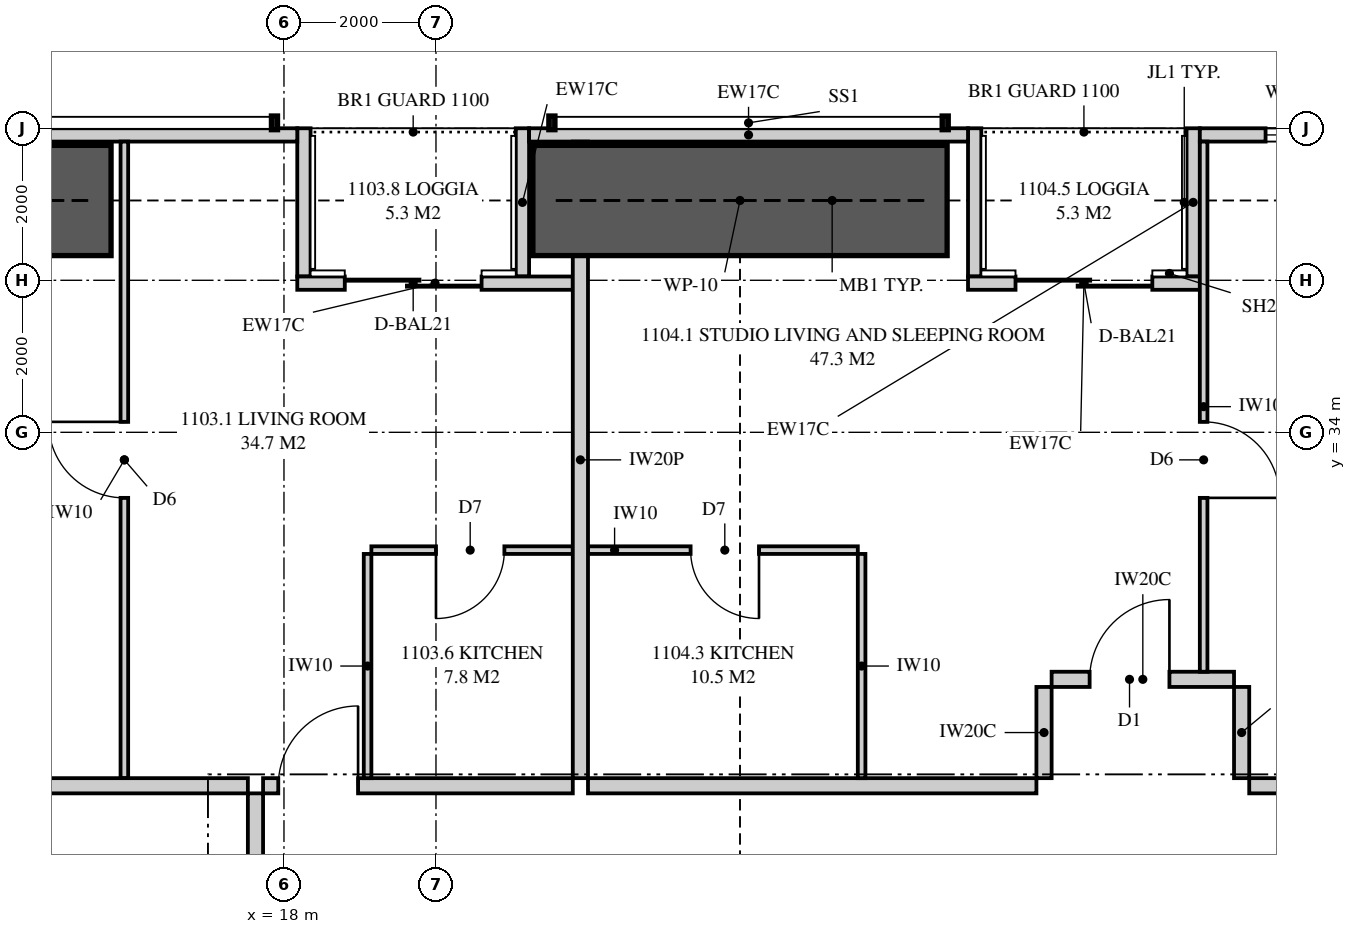
"""IFC4 building model, lengths in metres.
Left out: names, types, materials, properties, quantities, classifications, styles, units other than length and angle.
Written with IfcOpenShell. Run it as: python <this file> out.ifc"""

import sys

from ifc_helpers import new_model, si_unit, direction, frame, frame_2d, origin, place, context, subcontext, project, spatial, polyline, rectangle, outline, extrude, element, fill, save


model = new_model("IFC4")
c1 = context("Model", 3, precision=1e-05, world=origin(), true_north=direction((0.0, 1.0)))
c2 = subcontext(c1, "Body", "Model", "MODEL_VIEW")
j1 = project(units=[si_unit("LENGTHUNIT", "METRE"), si_unit("PLANEANGLEUNIT", "RADIAN")], contexts=[c1])
p1 = place(None, origin())
s1 = spatial("IfcSite", under=j1, at=p1, CompositionType="ELEMENT")
p2 = place(p1, origin())
s2 = spatial("IfcBuilding", under=s1, at=p2, CompositionType="ELEMENT")
p3 = place(p2, frame((0.0, 0.0, 44.45)))
s3 = spatial("IfcBuildingStorey", under=s2, at=p3, CompositionType="ELEMENT", Elevation=44.45)
p4 = place(p3, frame((38.149, 37.913, 0.0), z_axis=(0.0, 0.0, 1.0), x_axis=(-1.0, 0.0, 0.0)))
e1 = element("IfcWall", 1, at=p4, inside=s3, PredefinedType="SOLIDWALL", context=c2, shape_type="SweptSolid", body=[
    extrude(outline(polyline([(0.0, 0.0), (8.099, 0.0), (8.099, 2.15), (3.149, 2.15), (3.149, 3.11), (2.993, 3.11), (2.993, 2.15), (2.945, 2.15), (2.945, 3.11), (0.0, 3.11), (0.0, 0.0)])), frame((0.0, 0.087, 0.0), z_axis=(0.0, -1.0, 0.0), x_axis=(1.0, 0.0, 0.0)), (0.0, 0.0, 1.0), 0.175),
])
p5 = place(p4, frame((6.034, 0.0, 0.4)))
e2 = element("IfcOpeningElement", 2, at=p5, cuts=e1, PredefinedType="OPENING", context=c2, shape_type="SweptSolid", body=[
    extrude(rectangle(XDim=1.2, YDim=1.7, at=frame_2d((0.6, 0.85))), frame((0.0, 0.097, 0.0), z_axis=(0.0, -1.0, 0.0), x_axis=(1.0, 0.0, 0.0)), (0.0, 0.0, 1.0), 0.195),
])
p6 = place(p3, frame((27.0, 37.913, 0.0), z_axis=(0.0, 0.0, 1.0), x_axis=(-1.0, 0.0, 0.0)))
e3 = element("IfcWall", 3, at=p6, inside=s3, PredefinedType="SOLIDWALL", context=c2, shape_type="SweptSolid", body=[
    extrude(rectangle(XDim=5.775, YDim=0.175, at=frame_2d((2.887, 0.0))), origin(), (0.0, 0.0, 1.0), 2.15),
])
p7 = place(p3, frame((18.175, 37.913, 0.0), z_axis=(0.0, 0.0, 1.0), x_axis=(-1.0, 0.0, 0.0)))
e4 = element("IfcWall", 4, at=p7, inside=s3, PredefinedType="SOLIDWALL", context=c2, shape_type="SweptSolid", body=[
    extrude(outline(polyline([(0.0, 0.0), (13.124, 0.0), (13.124, 3.11), (5.379, 3.11), (5.379, 2.15), (5.331, 2.15), (5.331, 3.11), (5.175, 3.11), (5.175, 2.15), (0.0, 2.15), (0.0, 0.0)])), frame((0.0, 0.087, 0.0), z_axis=(0.0, -1.0, 0.0), x_axis=(1.0, 0.0, 0.0)), (0.0, 0.0, 1.0), 0.175),
])
p8 = place(p7, frame((9.125, 0.0, 0.4)))
e5 = element("IfcOpeningElement", 5, at=p8, cuts=e4, PredefinedType="OPENING", context=c2, shape_type="SweptSolid", body=[
    extrude(rectangle(XDim=1.8, YDim=1.7, at=frame_2d((0.9, 0.85))), frame((0.0, 0.097, 0.0), z_axis=(0.0, -1.0, 0.0), x_axis=(1.0, 0.0, 0.0)), (0.0, 0.0, 1.0), 0.195),
])
p9 = place(p3, frame((30.05, 35.962, 0.0), z_axis=(0.0, 0.0, 1.0), x_axis=(-1.0, 0.0, 0.0)))
e6 = element("IfcWall", 6, at=p9, inside=s3, PredefinedType="SOLIDWALL", context=c2, shape_type="SweptSolid", body=[
    extrude(rectangle(XDim=3.05, YDim=0.175, at=frame_2d((1.525, 0.0))), origin(), (0.0, 0.0, 1.0), 3.11),
])
p10 = place(p9, frame((0.625, 0.0, 0.0)))
e7 = element("IfcOpeningElement", 7, at=p10, cuts=e6, PredefinedType="OPENING", context=c2, shape_type="SweptSolid", body=[
    extrude(rectangle(XDim=1.8, YDim=2.1, at=frame_2d((0.9, 1.05))), frame((0.0, 0.097, 0.0), z_axis=(0.0, -1.0, 0.0), x_axis=(1.0, 0.0, 0.0)), (0.0, 0.0, 1.0), 0.195),
])
for number, where, z_axis, x_axis in (
    (8, (29.962, 38.0, 0.0), (0.0, 0.0, 1.0), (0.0, -1.0, 0.0)),
    (9, (27.087, 38.0, 0.0), (0.0, 0.0, 1.0), (0.0, -1.0, 0.0)),
):
    element("IfcWall", number, at=place(p3, frame(where, z_axis=z_axis, x_axis=x_axis)), inside=s3, PredefinedType="SOLIDWALL", context=c2, shape_type="SweptSolid", body=[
        extrude(outline(polyline([(0.0, 0.0), (1.95, 0.0), (1.95, 3.11), (1.75, 3.11), (1.75, 2.15), (0.15, 2.15), (0.15, 3.11), (0.0, 3.11), (0.0, 0.0)])), frame((0.0, 0.087, 0.0), z_axis=(0.0, -1.0, 0.0), x_axis=(1.0, 0.0, 0.0)), (0.0, 0.0, 1.0), 0.175),
    ])
p11 = place(p3, frame((21.8, 35.962, 0.0), z_axis=(0.0, 0.0, 1.0), x_axis=(-1.0, 0.0, 0.0)))
e10 = element("IfcWall", 10, at=p11, inside=s3, PredefinedType="SOLIDWALL", context=c2, shape_type="SweptSolid", body=[
    extrude(rectangle(XDim=3.625, YDim=0.175, at=frame_2d((1.812, 0.0))), origin(), (0.0, 0.0, 1.0), 3.11),
])
p12 = place(p11, frame((1.2, 0.0, 0.0)))
e11 = element("IfcOpeningElement", 11, at=p12, cuts=e10, PredefinedType="OPENING", context=c2, shape_type="SweptSolid", body=[
    extrude(rectangle(XDim=1.8, YDim=2.1, at=frame_2d((0.9, 1.05))), frame((0.0, 0.097, 0.0), z_axis=(0.0, -1.0, 0.0), x_axis=(1.0, 0.0, 0.0)), (0.0, 0.0, 1.0), 0.195),
])
for number, where, z_axis, x_axis in (
    (12, (21.137, 38.0, 0.0), (0.0, 0.0, 1.0), (0.0, -1.0, 0.0)),
    (13, (18.262, 38.0, 0.0), (0.0, 0.0, 1.0), (0.0, -1.0, 0.0)),
):
    element("IfcWall", number, at=place(p3, frame(where, z_axis=z_axis, x_axis=x_axis)), inside=s3, PredefinedType="SOLIDWALL", context=c2, shape_type="SweptSolid", body=[
        extrude(outline(polyline([(0.0, 0.0), (1.95, 0.0), (1.95, 3.11), (1.75, 3.11), (1.75, 2.15), (0.15, 2.15), (0.15, 3.11), (0.0, 3.11), (0.0, 0.0)])), frame((0.0, 0.087, 0.0), z_axis=(0.0, -1.0, 0.0), x_axis=(1.0, 0.0, 0.0)), (0.0, 0.0, 1.0), 0.175),
    ])
p13 = place(p3, frame((21.9, 37.825, 0.0), z_axis=(0.0, 0.0, 1.0), x_axis=(0.0, -1.0, 0.0)))
e14 = element("IfcWall", 14, at=p13, inside=s3, PredefinedType="PARTITIONING", context=c2, shape_type="SweptSolid", body=[
    extrude(outline(polyline([(0.529, 2.15), (0.0, 2.15), (0.0, 0.0), (0.529, 0.0), (0.529, 0.056), (1.021, 0.056), (1.021, 0.0), (8.375, 0.0), (8.375, 3.11), (1.685, 3.11), (1.685, 2.15), (1.021, 2.15), (1.021, 2.094), (0.529, 2.094), (0.529, 2.15)])), frame((0.0, 0.1, 0.0), z_axis=(0.0, -1.0, 0.0), x_axis=(1.0, 0.0, 0.0)), (0.0, 0.0, 1.0), 0.2),
])
p14 = place(p3, frame((17.725, 29.35, 0.0), z_axis=(0.0, 0.0, 1.0), x_axis=(1.0, 0.0, 0.0)))
e15 = element("IfcWall", 15, at=p14, inside=s3, PredefinedType="PARTITIONING", context=c2, shape_type="SweptSolid", body=[
    extrude(rectangle(XDim=4.075, YDim=0.2, at=frame_2d((2.038, 0.0))), origin(), (0.0, 0.0, 1.0), 3.11),
])
p15 = place(p14, frame((0.2, 0.0, 0.0)))
e16 = element("IfcOpeningElement", 16, at=p15, cuts=e15, PredefinedType="OPENING", context=c2, shape_type="SweptSolid", body=[
    extrude(rectangle(XDim=1.05, YDim=2.2, at=frame_2d((0.525, 1.1))), frame((0.0, 0.11, 0.0), z_axis=(0.0, -1.0, 0.0), x_axis=(1.0, 0.0, 0.0)), (0.0, 0.0, 1.0), 0.22),
])
p16 = place(p3, frame((19.15, 32.45, 0.0), z_axis=(0.0, 0.0, 1.0), x_axis=(1.0, 0.0, 0.0)))
e17 = element("IfcWall", 17, at=p16, inside=s3, PredefinedType="PARTITIONING", context=c2, shape_type="SweptSolid", body=[
    extrude(rectangle(XDim=2.65, YDim=0.1, at=frame_2d((1.325, 0.0))), origin(), (0.0, 0.0, 1.0), 3.11),
])
p17 = place(p16, frame((0.85, 0.0, 0.0)))
e18 = element("IfcOpeningElement", 18, at=p17, cuts=e17, PredefinedType="OPENING", context=c2, shape_type="SweptSolid", body=[
    extrude(rectangle(XDim=0.9, YDim=2.1, at=frame_2d((0.45, 1.05))), frame((0.0, 0.06, 0.0), z_axis=(0.0, -1.0, 0.0), x_axis=(1.0, 0.0, 0.0)), (0.0, 0.0, 1.0), 0.12),
])
p18 = place(p3, frame((19.1, 32.4, 0.0), z_axis=(0.0, 0.0, 1.0), x_axis=(0.0, -1.0, 0.0)))
e19 = element("IfcWall", 19, at=p18, inside=s3, PredefinedType="PARTITIONING", context=c2, shape_type="SweptSolid", body=[
    extrude(rectangle(XDim=2.95, YDim=0.1, at=frame_2d((1.475, 0.0))), origin(), (0.0, 0.0, 1.0), 3.11),
])
p19 = place(p3, frame((15.9, 37.825, 0.0), z_axis=(0.0, 0.0, 1.0), x_axis=(0.0, -1.0, 0.0)))
e20 = element("IfcWall", 20, at=p19, inside=s3, PredefinedType="PARTITIONING", context=c2, shape_type="SweptSolid", body=[
    extrude(outline(polyline([(0.0, 0.0), (8.375, 0.0), (8.375, 3.11), (1.635, 3.11), (1.635, 2.15), (0.0, 2.15), (0.0, 3.11), (0.0, 0.0)])), frame((0.0, 0.05, 0.0), z_axis=(0.0, -1.0, 0.0), x_axis=(1.0, 0.0, 0.0)), (0.0, 0.0, 1.0), 0.1),
])
p20 = place(p19, frame((3.688, 0.0, 0.0)))
e21 = element("IfcOpeningElement", 21, at=p20, cuts=e20, PredefinedType="OPENING", context=c2, shape_type="SweptSolid", body=[
    extrude(rectangle(XDim=1.0, YDim=2.1, at=frame_2d((0.5, 1.05))), frame((0.0, 0.06, 0.0), z_axis=(0.0, -1.0, 0.0), x_axis=(1.0, 0.0, 0.0)), (0.0, 0.0, 1.0), 0.12),
])
p21 = place(p3, frame((22.0, 29.35, 0.0), z_axis=(0.0, 0.0, 1.0), x_axis=(1.0, 0.0, 0.0)))
e22 = element("IfcWall", 22, at=p21, inside=s3, PredefinedType="PARTITIONING", context=c2, shape_type="SweptSolid", body=[
    extrude(outline(polyline([(0.0, 0.0), (5.9, 0.0), (5.9, 3.11), (2.337, 3.11), (2.337, 2.541), (1.663, 2.541), (1.663, 3.11), (0.0, 3.11), (0.0, 0.0)])), frame((0.0, 0.1, 0.0), z_axis=(0.0, -1.0, 0.0), x_axis=(1.0, 0.0, 0.0)), (0.0, 0.0, 1.0), 0.2),
])
p22 = place(p3, frame((22.0, 32.45, 0.0), z_axis=(0.0, 0.0, 1.0), x_axis=(1.0, 0.0, 0.0)))
e23 = element("IfcWall", 23, at=p22, inside=s3, PredefinedType="PARTITIONING", context=c2, shape_type="SweptSolid", body=[
    extrude(outline(polyline([(0.0, 0.0), (3.55, 0.0), (3.55, 3.11), (2.287, 3.11), (2.287, 2.541), (1.713, 2.541), (1.713, 3.11), (0.0, 3.11), (0.0, 0.0)])), frame((0.0, 0.05, 0.0), z_axis=(0.0, -1.0, 0.0), x_axis=(1.0, 0.0, 0.0)), (0.0, 0.0, 1.0), 0.1),
])
p23 = place(p22, frame((1.35, 0.0, 0.0)))
e24 = element("IfcOpeningElement", 24, at=p23, cuts=e23, PredefinedType="OPENING", context=c2, shape_type="SweptSolid", body=[
    extrude(rectangle(XDim=0.9, YDim=2.1, at=frame_2d((0.45, 1.05))), frame((0.0, 0.06, 0.0), z_axis=(0.0, -1.0, 0.0), x_axis=(1.0, 0.0, 0.0)), (0.0, 0.0, 1.0), 0.12),
])
p24 = place(p3, frame((25.6, 32.4, 0.0), z_axis=(0.0, 0.0, 1.0), x_axis=(0.0, -1.0, 0.0)))
e25 = element("IfcWall", 25, at=p24, inside=s3, PredefinedType="PARTITIONING", context=c2, shape_type="SweptSolid", body=[
    extrude(rectangle(XDim=2.95, YDim=0.1, at=frame_2d((1.475, 0.0))), origin(), (0.0, 0.0, 1.0), 3.11),
])
p25 = place(p3, frame((30.1, 37.825, 0.0), z_axis=(0.0, 0.0, 1.0), x_axis=(0.0, -1.0, 0.0)))
e26 = element("IfcWall", 26, at=p25, inside=s3, PredefinedType="PARTITIONING", context=c2, shape_type="SweptSolid", body=[
    extrude(outline(polyline([(0.0, 0.0), (6.975, 0.0), (6.975, 3.11), (1.635, 3.11), (1.635, 2.15), (0.0, 2.15), (0.0, 3.11), (0.0, 0.0)])), frame((0.0, 0.05, 0.0), z_axis=(0.0, -1.0, 0.0), x_axis=(1.0, 0.0, 0.0)), (0.0, 0.0, 1.0), 0.1),
])
p26 = place(p25, frame((3.688, 0.0, 0.0)))
e27 = element("IfcOpeningElement", 27, at=p26, cuts=e26, PredefinedType="OPENING", context=c2, shape_type="SweptSolid", body=[
    extrude(rectangle(XDim=1.0, YDim=2.1, at=frame_2d((0.5, 1.05))), frame((0.0, 0.06, 0.0), z_axis=(0.0, -1.0, 0.0), x_axis=(1.0, 0.0, 0.0)), (0.0, 0.0, 1.0), 0.12),
])
p27 = place(p3, frame((2.0, 29.35, 0.0), z_axis=(0.0, 0.0, 1.0), x_axis=(1.0, 0.0, 0.0)))
e28 = element("IfcWall", 28, at=p27, inside=s3, PredefinedType="PARTITIONING", context=c2, shape_type="SweptSolid", body=[
    extrude(outline(polyline([(0.0, 0.0), (15.525, 0.0), (15.525, 3.11), (11.337, 3.11), (11.337, 2.541), (10.663, 2.541), (10.663, 3.11), (9.51, 3.11), (9.51, 2.51), (6.89, 2.51), (6.89, 3.11), (2.969, 3.11), (2.969, 2.541), (2.577, 2.541), (2.577, 2.15), (0.733, 2.15), (0.733, 3.11), (0.0, 3.11), (0.0, 0.0)])), frame((0.0, 0.1, 0.0), z_axis=(0.0, -1.0, 0.0), x_axis=(1.0, 0.0, 0.0)), (0.0, 0.0, 1.0), 0.2),
])
p28 = place(p3, frame((17.625, 15.25, 0.0), z_axis=(0.0, 0.0, 1.0), x_axis=(0.0, 1.0, 0.0)))
e29 = element("IfcWall", 29, at=p28, inside=s3, PredefinedType="PARTITIONING", context=c2, shape_type="SweptSolid", body=[
    extrude(outline(polyline([(0.0, 0.0), (14.0, 0.0), (14.0, 3.11), (10.087, 3.11), (10.087, 2.541), (9.413, 2.541), (9.413, 3.11), (0.0, 3.11), (0.0, 0.0)])), frame((0.0, 0.1, 0.0), z_axis=(0.0, -1.0, 0.0), x_axis=(1.0, 0.0, 0.0)), (0.0, 0.0, 1.0), 0.2),
])
p29 = place(p28, frame((6.5, 0.0, 0.0)))
e30 = element("IfcOpeningElement", 30, at=p29, cuts=e29, PredefinedType="OPENING", context=c2, shape_type="SweptSolid", body=[
    extrude(rectangle(XDim=1.05, YDim=2.2, at=frame_2d((0.525, 1.1))), frame((0.0, 0.11, 0.0), z_axis=(0.0, -1.0, 0.0), x_axis=(1.0, 0.0, 0.0)), (0.0, 0.0, 1.0), 0.22),
])
p30 = place(p3, frame((30.7, 29.35, 0.0), z_axis=(0.0, 0.0, 1.0), x_axis=(1.0, 0.0, 0.0)))
e31 = element("IfcWall", 31, at=p30, inside=s3, PredefinedType="PARTITIONING", context=c2, shape_type="SweptSolid", body=[
    extrude(outline(polyline([(0.0, 0.0), (5.5, 0.0), (5.5, 3.11), (4.637, 3.11), (4.637, 2.541), (3.963, 2.541), (3.963, 3.11), (0.0, 3.11), (0.0, 0.0)])), frame((0.0, 0.1, 0.0), z_axis=(0.0, -1.0, 0.0), x_axis=(1.0, 0.0, 0.0)), (0.0, 0.0, 1.0), 0.2),
])
p31 = place(p3, frame((28.1, 30.75, 0.0), z_axis=(0.0, 0.0, 1.0), x_axis=(1.0, 0.0, 0.0)))
e32 = element("IfcWall", 32, at=p31, inside=s3, PredefinedType="PARTITIONING", context=c2, shape_type="SweptSolid", body=[
    extrude(rectangle(XDim=2.4, YDim=0.2, at=frame_2d((1.2, 0.0))), origin(), (0.0, 0.0, 1.0), 3.11),
])
p32 = place(p31, frame((0.5, 0.0, 0.0)))
e33 = element("IfcOpeningElement", 33, at=p32, cuts=e32, PredefinedType="OPENING", context=c2, shape_type="SweptSolid", body=[
    extrude(rectangle(XDim=1.05, YDim=2.2, at=frame_2d((0.525, 1.1))), frame((0.0, 0.11, 0.0), z_axis=(0.0, -1.0, 0.0), x_axis=(1.0, 0.0, 0.0)), (0.0, 0.0, 1.0), 0.22),
])
for number, where, z_axis, x_axis in (
    (34, (28.0, 29.45, 0.0), (0.0, 0.0, 1.0), (0.0, 1.0, 0.0)),
    (35, (30.6, 29.45, 0.0), (0.0, 0.0, 1.0), (0.0, 1.0, 0.0)),
):
    element("IfcWall", number, at=place(p3, frame(where, z_axis=z_axis, x_axis=x_axis)), inside=s3, PredefinedType="PARTITIONING", context=c2, shape_type="SweptSolid", body=[
        extrude(rectangle(XDim=1.2, YDim=0.2, at=frame_2d((0.6, 0.0))), origin(), (0.0, 0.0, 1.0), 3.11),
    ])
for number, where, z_axis, x_axis in (
    (36, (21.275, 37.05, 0.0), (0.0, 0.0, 1.0), (1.0, 0.0, 0.0)),
    (37, (10.275, 37.05, 0.0), (0.0, 0.0, 1.0), (1.0, 0.0, 0.0)),
):
    element("IfcWall", number, at=place(p3, frame(where, z_axis=z_axis, x_axis=x_axis)), inside=s3, PredefinedType="SHEAR", context=c2, shape_type="SweptSolid", body=[
        extrude(rectangle(XDim=5.45, YDim=1.45, at=frame_2d((2.725, 0.0))), origin(), (0.0, 0.0, 1.0), 3.35),
    ])
p33 = place(p5, origin())
e38 = element("IfcWindow", 38, at=p33, inside=s3, PartitioningType="SINGLE_PANEL", PredefinedType="WINDOW", context=c2, shape_type="SweptSolid", body=[
    extrude(rectangle(XDim=1.2, YDim=1.7, at=frame_2d((0.6, 0.85))), frame((0.0, 0.03, 0.0), z_axis=(0.0, -1.0, 0.0), x_axis=(1.0, 0.0, 0.0)), (0.0, 0.0, 1.0), 0.06),
])
fill(e2, e38)
p34 = place(p10, origin())
e39 = element("IfcDoor", 39, at=p34, inside=s3, OperationType="SLIDING_TO_LEFT", PredefinedType="DOOR", context=c2, shape_type="SweptSolid", body=[
    extrude(rectangle(XDim=1.8, YDim=2.1, at=frame_2d((0.9, 1.05))), frame((0.0, 0.025, 0.0), z_axis=(0.0, -1.0, 0.0), x_axis=(1.0, 0.0, 0.0)), (0.0, 0.0, 1.0), 0.05),
])
fill(e7, e39)
p35 = place(p12, origin())
e40 = element("IfcDoor", 40, at=p35, inside=s3, OperationType="SLIDING_TO_LEFT", PredefinedType="DOOR", context=c2, shape_type="SweptSolid", body=[
    extrude(rectangle(XDim=1.8, YDim=2.1, at=frame_2d((0.9, 1.05))), frame((0.0, 0.025, 0.0), z_axis=(0.0, -1.0, 0.0), x_axis=(1.0, 0.0, 0.0)), (0.0, 0.0, 1.0), 0.05),
])
fill(e11, e40)
p36 = place(p15, origin())
e41 = element("IfcDoor", 41, at=p36, inside=s3, OperationType="SINGLE_SWING_RIGHT", PredefinedType="DOOR", context=c2, shape_type="SweptSolid", body=[
    extrude(rectangle(XDim=1.05, YDim=2.2, at=frame_2d((0.525, 1.1))), frame((0.0, 0.025, 0.0), z_axis=(0.0, -1.0, 0.0), x_axis=(1.0, 0.0, 0.0)), (0.0, 0.0, 1.0), 0.05),
])
fill(e16, e41)
p37 = place(p17, frame((0.9, 0.0, 0.0), z_axis=(0.0, 0.0, 1.0), x_axis=(-1.0, 0.0, 0.0)))
e42 = element("IfcDoor", 42, at=p37, inside=s3, OperationType="SINGLE_SWING_RIGHT", PredefinedType="DOOR", context=c2, shape_type="SweptSolid", body=[
    extrude(rectangle(XDim=0.9, YDim=2.1, at=frame_2d((0.45, 1.05))), frame((0.0, 0.025, 0.0), z_axis=(0.0, -1.0, 0.0), x_axis=(1.0, 0.0, 0.0)), (0.0, 0.0, 1.0), 0.05),
])
fill(e18, e42)
p38 = place(p20, frame((1.0, 0.0, 0.0), z_axis=(0.0, 0.0, 1.0), x_axis=(-1.0, 0.0, 0.0)))
e43 = element("IfcDoor", 43, at=p38, inside=s3, OperationType="SINGLE_SWING_RIGHT", PredefinedType="DOOR", context=c2, shape_type="SweptSolid", body=[
    extrude(rectangle(XDim=1.0, YDim=2.1, at=frame_2d((0.5, 1.05))), frame((0.0, 0.025, 0.0), z_axis=(0.0, -1.0, 0.0), x_axis=(1.0, 0.0, 0.0)), (0.0, 0.0, 1.0), 0.05),
])
fill(e21, e43)
p39 = place(p32, origin())
e44 = element("IfcDoor", 44, at=p39, inside=s3, OperationType="SINGLE_SWING_RIGHT", PredefinedType="DOOR", context=c2, shape_type="SweptSolid", body=[
    extrude(rectangle(XDim=1.05, YDim=2.2, at=frame_2d((0.525, 1.1))), frame((0.0, 0.025, 0.0), z_axis=(0.0, -1.0, 0.0), x_axis=(1.0, 0.0, 0.0)), (0.0, 0.0, 1.0), 0.05),
])
fill(e33, e44)
p40 = place(p23, frame((0.9, 0.0, 0.0), z_axis=(0.0, 0.0, 1.0), x_axis=(-1.0, 0.0, 0.0)))
e45 = element("IfcDoor", 45, at=p40, inside=s3, OperationType="SINGLE_SWING_LEFT", PredefinedType="DOOR", context=c2, shape_type="SweptSolid", body=[
    extrude(rectangle(XDim=0.9, YDim=2.1, at=frame_2d((0.45, 1.05))), frame((0.0, 0.025, 0.0), z_axis=(0.0, -1.0, 0.0), x_axis=(1.0, 0.0, 0.0)), (0.0, 0.0, 1.0), 0.05),
])
fill(e24, e45)
p41 = place(p26, origin())
e46 = element("IfcDoor", 46, at=p41, inside=s3, OperationType="SINGLE_SWING_RIGHT", PredefinedType="DOOR", context=c2, shape_type="SweptSolid", body=[
    extrude(rectangle(XDim=1.0, YDim=2.1, at=frame_2d((0.5, 1.05))), frame((0.0, 0.025, 0.0), z_axis=(0.0, -1.0, 0.0), x_axis=(1.0, 0.0, 0.0)), (0.0, 0.0, 1.0), 0.05),
])
fill(e27, e46)
save(model, sys.argv[1])
